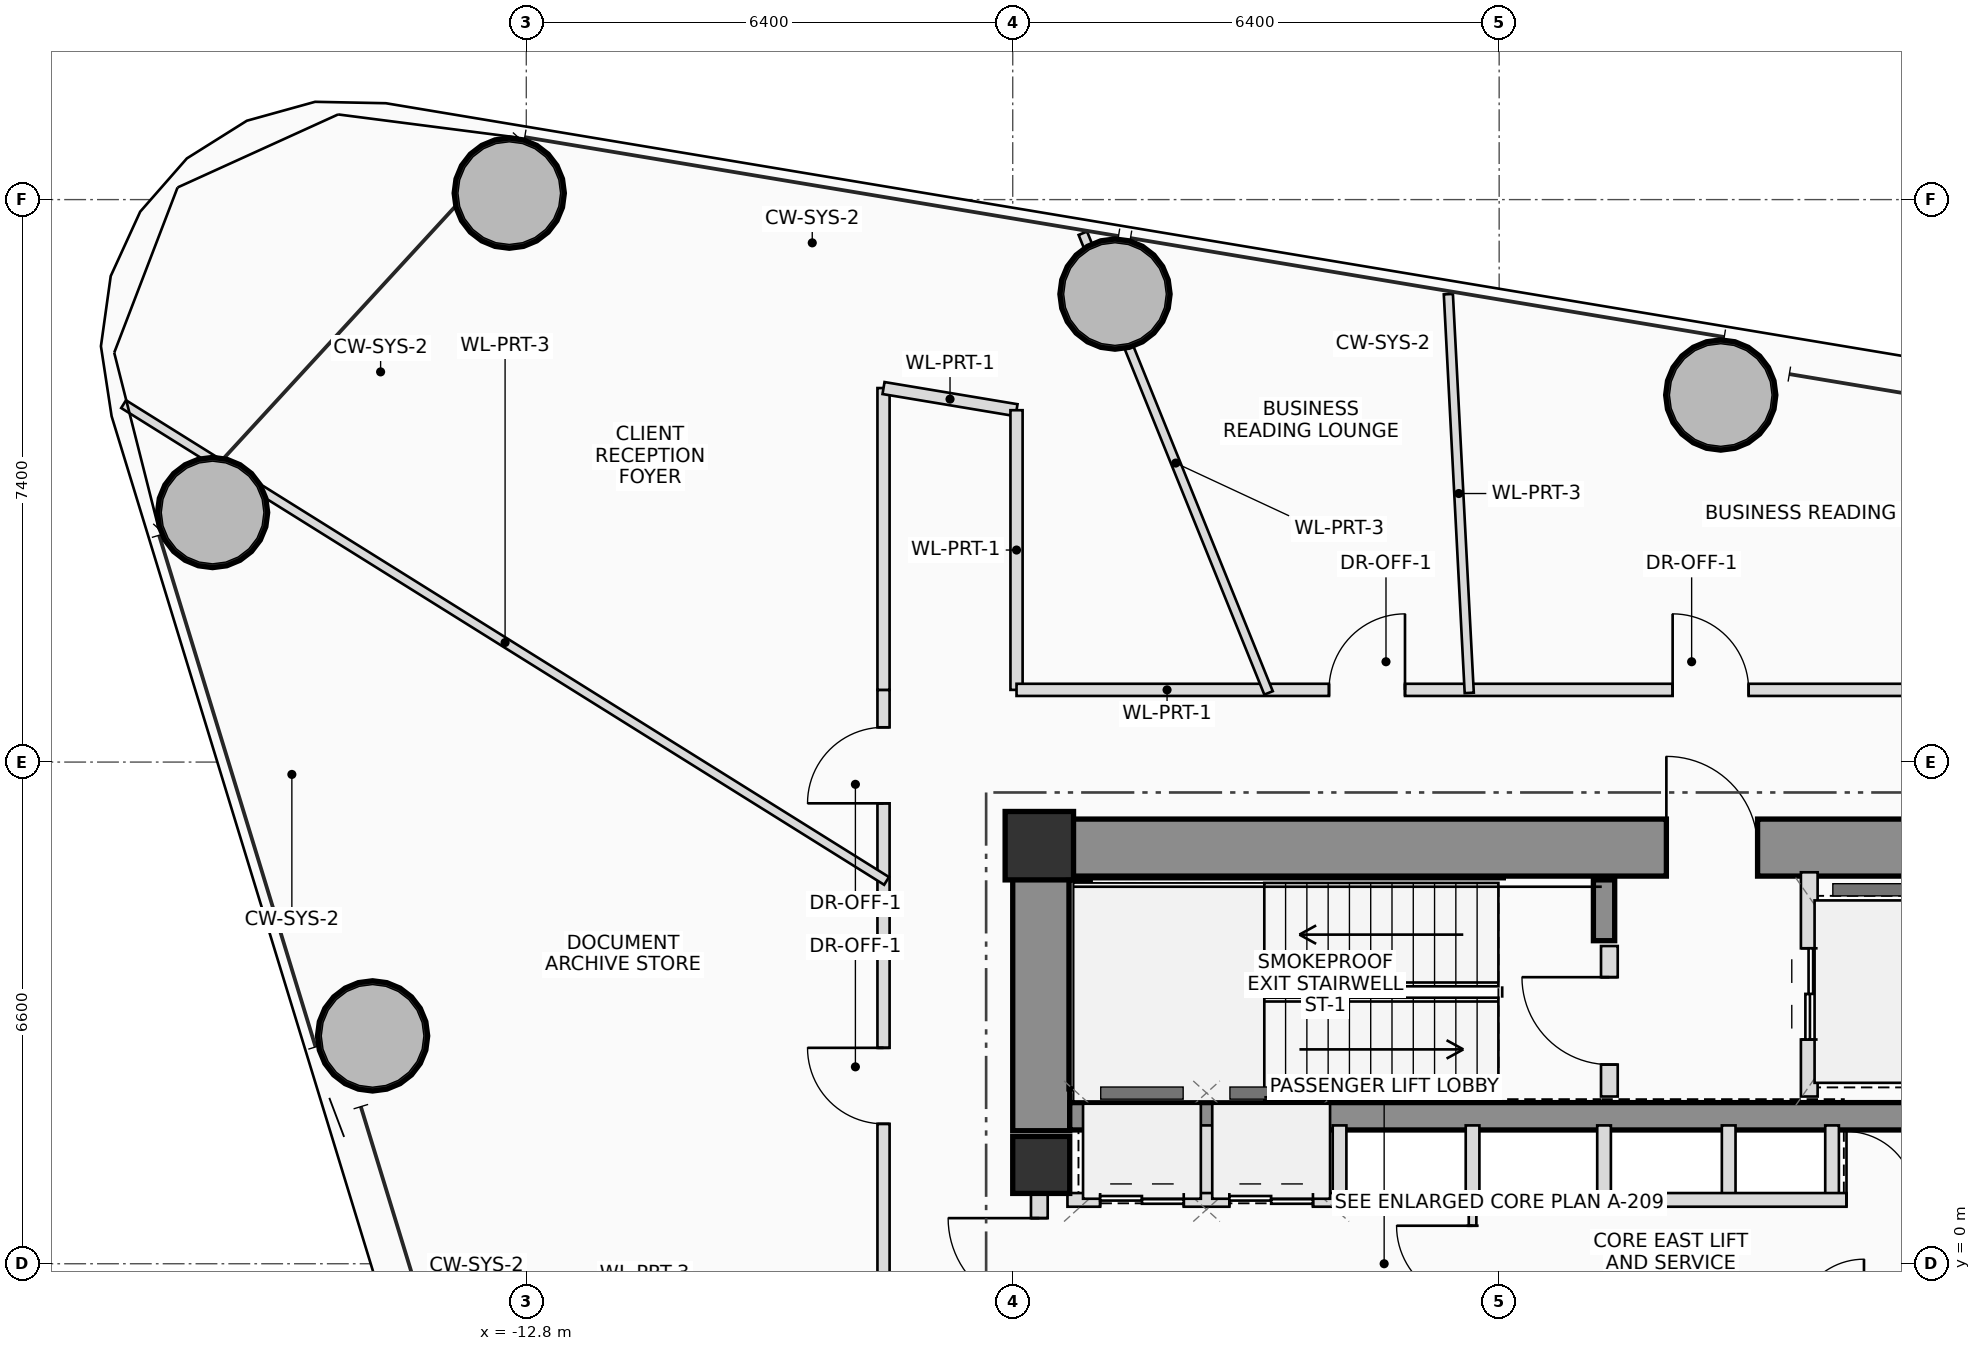
"""IFC4 building model, lengths in metres.
Left out: names, types, materials, properties, quantities, classifications, styles, units other than length and angle.
Written with IfcOpenShell. Run it as: python <this file> out.ifc"""

import sys

from ifc_helpers import new_model, si_unit, direction, frame, frame_2d, origin, origin_2d, place, context, subcontext, project, spatial, rectangle, hollow_circle, extrude, source, transform, mapped, element, fill, save


model = new_model("IFC4")
c1 = context("Model", 3, precision=1e-05, world=origin(), true_north=direction((0.0, 1.0)))
c2 = subcontext(c1, "Body", "Model", "MODEL_VIEW")
j1 = project(units=[si_unit("LENGTHUNIT", "METRE"), si_unit("PLANEANGLEUNIT", "RADIAN")], contexts=[c1])
p1 = place(None, origin())
s1 = spatial("IfcSite", under=j1, at=p1, CompositionType="ELEMENT")
p2 = place(p1, origin())
s2 = spatial("IfcBuilding", under=s1, at=p2, CompositionType="ELEMENT")
p3 = place(p2, frame((0.0, 0.0, 104.9)))
s3 = spatial("IfcBuildingStorey", under=s2, at=p3, CompositionType="ELEMENT", Elevation=104.9)
m1 = source(origin(), c2, "Body", "SweptSolid", [
    extrude(rectangle(XDim=0.9, YDim=0.9, at=origin_2d()), origin(), (0.0, 0.0, 1.0), 3.75),
])
p4 = place(p3, frame((-6.05, 5.5, 0.0), z_axis=(0.0, 0.0, 1.0), x_axis=(1.0, 0.0, 0.0)))
e1 = element("IfcColumn", 1, at=p4, inside=s3, PredefinedType="COLUMN", context=c2, shape_type="MappedRepresentation", body=[
    mapped(m1, transform((0.0, 0.0, 0.0), scale=1.0)),
])
p5 = place(p3, frame((-6.4, 5.475, 0.0), z_axis=(0.0, 0.0, 1.0), x_axis=(1.0, 0.0, 0.0)))
e2 = element("IfcWall", 2, at=p5, inside=s3, PredefinedType="SHEAR", context=c2, shape_type="SweptSolid", body=[
    extrude(rectangle(XDim=12.8, YDim=0.75, at=frame_2d((6.4, 0.0))), origin(), (0.0, 0.0, 1.0), 3.75),
])
p6 = place(p5, frame((8.6, 0.0, 0.0)))
e3 = element("IfcOpeningElement", 3, at=p6, cuts=e2, PredefinedType="OPENING", context=c2, shape_type="SweptSolid", body=[
    extrude(rectangle(XDim=1.2, YDim=2.2, at=frame_2d((0.6, 1.1))), frame((0.0, 0.385, 0.0), z_axis=(0.0, -1.0, 0.0), x_axis=(1.0, 0.0, 0.0)), (0.0, 0.0, 1.0), 0.77),
])
p7 = place(p3, frame((-6.025, 1.75, 0.0), z_axis=(0.0, 0.0, 1.0), x_axis=(0.0, 1.0, 0.0)))
e4 = element("IfcWall", 4, at=p7, inside=s3, PredefinedType="SHEAR", context=c2, shape_type="SweptSolid", body=[
    extrude(rectangle(XDim=3.35, YDim=0.75, at=frame_2d((1.675, 0.0))), origin(), (0.0, 0.0, 1.0), 3.75),
])
p8 = place(p3, frame((-5.65, 1.94, 0.0), z_axis=(0.0, 0.0, 1.0), x_axis=(1.0, 0.0, 0.0)))
e5 = element("IfcWall", 5, at=p8, inside=s3, PredefinedType="SHEAR", context=c2, shape_type="SweptSolid", body=[
    extrude(rectangle(XDim=11.3, YDim=0.36, at=frame_2d((5.65, 0.0))), origin(), (0.0, 0.0, 1.0), 3.75),
])
p9 = place(p3, frame((-5.52, 2.3, 0.0), z_axis=(0.0, 0.0, 1.0), x_axis=(0.0, 1.0, 0.0)))
e6 = element("IfcWall", 6, at=p9, inside=s3, PredefinedType="SHEAR", context=c2, shape_type="SweptSolid", body=[
    extrude(rectangle(XDim=2.75, YDim=0.28, at=frame_2d((1.375, 0.0))), origin(), (0.0, 0.0, 1.0), 3.75),
])
p10 = place(p3, frame((1.38, 4.25, 0.0), z_axis=(0.0, 0.0, 1.0), x_axis=(0.0, 1.0, 0.0)))
e7 = element("IfcWall", 7, at=p10, inside=s3, PredefinedType="SHEAR", context=c2, shape_type="SweptSolid", body=[
    extrude(rectangle(XDim=0.8, YDim=0.28, at=frame_2d((0.4, 0.0))), origin(), (0.0, 0.0, 1.0), 3.75),
])
m2 = source(origin(), c2, "Body", "SweptSolid", [
    extrude(rectangle(XDim=0.75, YDim=0.75, at=origin_2d()), origin(), (0.0, 0.0, 1.0), 3.75),
])
p11 = place(p3, frame((-6.025, 1.3, 0.0), z_axis=(0.0, 0.0, 1.0), x_axis=(1.0, 0.0, 0.0)))
e8 = element("IfcColumn", 8, at=p11, inside=s3, PredefinedType="COLUMN", context=c2, shape_type="MappedRepresentation", body=[
    mapped(m2, transform((0.0, 0.0, 0.0), scale=1.0)),
])
m3 = source(origin(), c2, "Body", "SweptSolid", [
    extrude(hollow_circle(Radius=0.725, WallThickness=0.05, at=origin_2d()), origin(), (0.0, 0.0, 1.0), 3.75),
])
for number, where, z_axis, x_axis in (
    (9, (2.915, 11.429, 0.0), (0.0, 0.0, 1.0), (1.0, 0.0, 0.0)),
    (10, (-5.054, 12.757, 0.0), (0.0, 0.0, 1.0), (1.0, 0.0, 0.0)),
    (11, (-13.024, 14.085, 0.0), (0.0, 0.0, 1.0), (1.0, 0.0, 0.0)),
    (12, (-16.927, 9.883, 0.0), (0.0, 0.0, 1.0), (1.0, 0.0, 0.0)),
    (13, (-14.823, 2.998, 0.0), (0.0, 0.0, 1.0), (1.0, 0.0, 0.0)),
):
    element("IfcColumn", number, at=place(p3, frame(where, z_axis=z_axis, x_axis=x_axis)), inside=s3, PredefinedType="COLUMN", context=c2, shape_type="MappedRepresentation", body=[
        mapped(m3, transform((0.0, 0.0, 0.0), scale=1.0)),
    ])
p12 = place(p3, frame((-6.05, -0.95, 0.0), z_axis=(0.0, 0.0, 1.0), x_axis=(0.0, 1.0, 0.0)))
e14 = element("IfcWall", 14, at=p12, inside=s3, PredefinedType="PLUMBINGWALL", context=c2, shape_type="SweptSolid", body=[
    extrude(rectangle(XDim=1.9, YDim=0.22, at=frame_2d((0.95, 0.0))), origin(), (0.0, 0.0, 1.0), 2.525),
])
p13 = place(p12, frame((0.35, 0.0, 0.0)))
e15 = element("IfcOpeningElement", 15, at=p13, cuts=e14, PredefinedType="OPENING", context=c2, shape_type="SweptSolid", body=[
    extrude(rectangle(XDim=1.2, YDim=2.2, at=frame_2d((0.6, 1.1))), frame((0.0, 0.12, 0.0), z_axis=(0.0, -1.0, 0.0), x_axis=(1.0, 0.0, 0.0)), (0.0, 0.0, 1.0), 0.24),
])
p14 = place(p3, frame((1.45, 2.2, 0.0), z_axis=(0.0, 0.0, 1.0), x_axis=(0.0, 1.0, 0.0)))
e16 = element("IfcWall", 16, at=p14, inside=s3, PredefinedType="PLUMBINGWALL", context=c2, shape_type="SweptSolid", body=[
    extrude(rectangle(XDim=1.98, YDim=0.22, at=frame_2d((0.99, 0.0))), origin(), (0.0, 0.0, 1.0), 3.545),
])
p15 = place(p14, frame((0.42, 0.0, 0.0)))
e17 = element("IfcOpeningElement", 17, at=p15, cuts=e16, PredefinedType="OPENING", context=c2, shape_type="SweptSolid", body=[
    extrude(rectangle(XDim=1.15, YDim=2.15, at=frame_2d((0.575, 1.075))), frame((0.0, 0.12, 0.0), z_axis=(0.0, -1.0, 0.0), x_axis=(1.0, 0.0, 0.0)), (0.0, 0.0, 1.0), 0.24),
])
p16 = place(p3, frame((4.08, 2.2, 0.0), z_axis=(0.0, 0.0, 1.0), x_axis=(0.0, 1.0, 0.0)))
e18 = element("IfcWall", 18, at=p16, inside=s3, PredefinedType="PLUMBINGWALL", context=c2, shape_type="SweptSolid", body=[
    extrude(rectangle(XDim=2.95, YDim=0.22, at=frame_2d((1.475, 0.0))), origin(), (0.0, 0.0, 1.0), 3.545),
])
p17 = place(p16, frame((0.75, 0.0, 0.0)))
e19 = element("IfcOpeningElement", 19, at=p17, cuts=e18, PredefinedType="OPENING", context=c2, shape_type="SweptSolid", body=[
    extrude(rectangle(XDim=1.2, YDim=2.25, at=frame_2d((0.6, 1.125))), frame((0.0, 0.12, 0.0), z_axis=(0.0, -1.0, 0.0), x_axis=(1.0, 0.0, 0.0)), (0.0, 0.0, 1.0), 0.24),
])
p18 = place(p3, frame((-0.35, -0.84, 0.0), z_axis=(0.0, 0.0, 1.0), x_axis=(0.0, 1.0, 0.0)))
e20 = element("IfcWall", 20, at=p18, inside=s3, PredefinedType="PARTITIONING", context=c2, shape_type="SweptSolid", body=[
    extrude(rectangle(XDim=1.68, YDim=0.1, at=frame_2d((0.84, 0.0))), origin(), (0.0, 0.0, 1.0), 3.545),
])
p19 = place(p18, frame((0.34, 0.0, 0.0)))
e21 = element("IfcOpeningElement", 21, at=p19, cuts=e20, PredefinedType="OPENING", context=c2, shape_type="SweptSolid", body=[
    extrude(rectangle(XDim=1.0, YDim=2.25, at=frame_2d((0.5, 1.125))), frame((0.0, 0.06, 0.0), z_axis=(0.0, -1.0, 0.0), x_axis=(1.0, 0.0, 0.0)), (0.0, 0.0, 1.0), 0.12),
])
for number, where, z_axis, x_axis in (
    (22, (-3.85, 0.84, 0.0), (0.0, 0.0, 1.0), (0.0, 1.0, 0.0)),
    (23, (-2.1, 0.84, 0.0), (0.0, 0.0, 1.0), (0.0, 1.0, 0.0)),
    (24, (-0.35, 0.84, 0.0), (0.0, 0.0, 1.0), (0.0, 1.0, 0.0)),
    (25, (1.38, 0.84, 0.0), (0.0, 0.0, 1.0), (0.0, 1.0, 0.0)),
    (26, (3.02, 0.84, 0.0), (0.0, 0.0, 1.0), (0.0, 1.0, 0.0)),
    (27, (4.38, 0.84, 0.0), (0.0, 0.0, 1.0), (0.0, 1.0, 0.0)),
):
    element("IfcWall", number, at=place(p3, frame(where, z_axis=z_axis, x_axis=x_axis)), inside=s3, PredefinedType="PLUMBINGWALL", context=c2, shape_type="SweptSolid", body=[
        extrude(rectangle(XDim=0.98, YDim=0.18, at=frame_2d((0.49, 0.0))), origin(), (0.0, 0.0, 1.0), 3.545),
    ])
p20 = place(p3, frame((-5.68, 0.84, 0.0), z_axis=(0.0, 0.0, 1.0), x_axis=(1.0, 0.0, 0.0)))
e28 = element("IfcWall", 28, at=p20, inside=s3, PredefinedType="PLUMBINGWALL", context=c2, shape_type="SweptSolid", body=[
    extrude(rectangle(XDim=11.33, YDim=0.18, at=frame_2d((5.665, 0.0))), origin(), (0.0, 0.0, 1.0), 3.545),
])
p21 = place(p20, frame((0.43, 0.0, 0.0)))
e29 = element("IfcOpeningElement", 29, at=p21, cuts=e28, PredefinedType="OPENING", context=c2, shape_type="SweptSolid", body=[
    extrude(rectangle(XDim=1.1, YDim=2.2, at=frame_2d((0.55, 1.1))), frame((0.0, 0.1, 0.0), z_axis=(0.0, -1.0, 0.0), x_axis=(1.0, 0.0, 0.0)), (0.0, 0.0, 1.0), 0.2),
])
p22 = place(p20, frame((2.13, 0.0, 0.0)))
e30 = element("IfcOpeningElement", 30, at=p22, cuts=e28, PredefinedType="OPENING", context=c2, shape_type="SweptSolid", body=[
    extrude(rectangle(XDim=1.1, YDim=2.2, at=frame_2d((0.55, 1.1))), frame((0.0, 0.1, 0.0), z_axis=(0.0, -1.0, 0.0), x_axis=(1.0, 0.0, 0.0)), (0.0, 0.0, 1.0), 0.2),
])
p23 = place(p20, frame((10.25, 0.0, 0.0)))
e31 = element("IfcOpeningElement", 31, at=p23, cuts=e28, PredefinedType="OPENING", context=c2, shape_type="SweptSolid", body=[
    extrude(rectangle(XDim=0.9, YDim=2.05, at=frame_2d((0.45, 1.025))), frame((0.0, 0.1, 0.0), z_axis=(0.0, -1.0, 0.0), x_axis=(1.0, 0.0, 0.0)), (0.0, 0.0, 1.0), 0.2),
])
p24 = place(p3, frame((-8.1, -7.55, 0.0), z_axis=(0.0, 0.0, 1.0), x_axis=(0.0, 1.0, 0.0)))
e32 = element("IfcWall", 32, at=p24, inside=s3, PredefinedType="PARTITIONING", context=c2, shape_type="SweptSolid", body=[
    extrude(rectangle(XDim=15.1, YDim=0.16, at=frame_2d((7.55, 0.0))), origin(), (0.0, 0.0, 1.0), 2.85),
])
p25 = place(p24, frame((5.185, 0.0, 0.0)))
e33 = element("IfcOpeningElement", 33, at=p25, cuts=e32, PredefinedType="OPENING", context=c2, shape_type="SweptSolid", body=[
    extrude(rectangle(XDim=1.0, YDim=2.25, at=frame_2d((0.5, 1.125))), frame((0.0, 0.09, 0.0), z_axis=(0.0, -1.0, 0.0), x_axis=(1.0, 0.0, 0.0)), (0.0, 0.0, 1.0), 0.18),
])
p26 = place(p24, frame((9.39, 0.0, 0.0)))
e34 = element("IfcOpeningElement", 34, at=p26, cuts=e32, PredefinedType="OPENING", context=c2, shape_type="SweptSolid", body=[
    extrude(rectangle(XDim=1.0, YDim=2.25, at=frame_2d((0.5, 1.125))), frame((0.0, 0.09, 0.0), z_axis=(0.0, -1.0, 0.0), x_axis=(1.0, 0.0, 0.0)), (0.0, 0.0, 1.0), 0.18),
])
p27 = place(p24, frame((13.607, 0.0, 0.0)))
e35 = element("IfcOpeningElement", 35, at=p27, cuts=e32, PredefinedType="OPENING", context=c2, shape_type="SweptSolid", body=[
    extrude(rectangle(XDim=1.0, YDim=2.25, at=frame_2d((0.5, 1.125))), frame((0.0, 0.09, 0.0), z_axis=(0.0, -1.0, 0.0), x_axis=(1.0, 0.0, 0.0)), (0.0, 0.0, 1.0), 0.18),
])
p28 = place(p3, frame((-8.1, 7.55, 0.0), z_axis=(0.0, 0.0, 1.0), x_axis=(0.0, 1.0, 0.0)))
e36 = element("IfcWall", 36, at=p28, inside=s3, PredefinedType="PARTITIONING", context=c2, shape_type="SweptSolid", body=[
    extrude(rectangle(XDim=3.971, YDim=0.16, at=frame_2d((1.985, 0.0))), origin(), (0.0, 0.0, 1.0), 2.85),
])
p29 = place(p3, frame((-8.1, 11.521, 0.0), z_axis=(0.0, 0.0, 1.0), x_axis=(0.986408796856, -0.164309724253, 0.0)))
e37 = element("IfcWall", 37, at=p29, inside=s3, PredefinedType="PARTITIONING", context=c2, shape_type="SweptSolid", body=[
    extrude(rectangle(XDim=1.774, YDim=0.16, at=frame_2d((0.887, 0.0))), origin(), (0.0, 0.0, 1.0), 3.545),
])
p30 = place(p3, frame((-6.35, 11.229, 0.0), z_axis=(0.0, 0.0, 1.0), x_axis=(0.0, -1.0, 0.0)))
e38 = element("IfcWall", 38, at=p30, inside=s3, PredefinedType="PARTITIONING", context=c2, shape_type="SweptSolid", body=[
    extrude(rectangle(XDim=3.679, YDim=0.16, at=frame_2d((1.84, 0.0))), origin(), (0.0, 0.0, 1.0), 3.05),
])
p31 = place(p3, frame((-6.35, 7.55, 0.0), z_axis=(0.0, 0.0, 1.0), x_axis=(1.0, 0.0, 0.0)))
e39 = element("IfcWall", 39, at=p31, inside=s3, PredefinedType="PARTITIONING", context=c2, shape_type="SweptSolid", body=[
    extrude(rectangle(XDim=12.7, YDim=0.16, at=frame_2d((6.35, 0.0))), origin(), (0.0, 0.0, 1.0), 2.85),
])
p32 = place(p31, frame((4.111, 0.0, 0.0)))
e40 = element("IfcOpeningElement", 40, at=p32, cuts=e39, PredefinedType="OPENING", context=c2, shape_type="SweptSolid", body=[
    extrude(rectangle(XDim=1.0, YDim=2.25, at=frame_2d((0.5, 1.125))), frame((0.0, 0.09, 0.0), z_axis=(0.0, -1.0, 0.0), x_axis=(1.0, 0.0, 0.0)), (0.0, 0.0, 1.0), 0.18),
])
p33 = place(p31, frame((8.632, 0.0, 0.0)))
e41 = element("IfcOpeningElement", 41, at=p33, cuts=e39, PredefinedType="OPENING", context=c2, shape_type="SweptSolid", body=[
    extrude(rectangle(XDim=1.0, YDim=2.25, at=frame_2d((0.5, 1.125))), frame((0.0, 0.09, 0.0), z_axis=(0.0, -1.0, 0.0), x_axis=(1.0, 0.0, 0.0)), (0.0, 0.0, 1.0), 0.18),
])
p34 = place(p3, frame((-0.394, 7.51, 0.0), z_axis=(0.0, 0.0, 1.0), x_axis=(-0.052329543677, 0.998629870802, 0.0)))
e42 = element("IfcWall", 42, at=p34, inside=s3, PredefinedType="PARTITIONING", context=c2, shape_type="SweptSolid", body=[
    extrude(rectangle(XDim=5.253, YDim=0.12, at=frame_2d((2.626, 0.0))), origin(), (0.0, 0.0, 1.0), 3.01),
])
p35 = place(p3, frame((-3.034, 7.51, 0.0), z_axis=(0.0, 0.0, 1.0), x_axis=(-0.37460229318, 0.927185591963, 0.0)))
e43 = element("IfcWall", 43, at=p35, inside=s3, PredefinedType="PARTITIONING", context=c2, shape_type="SweptSolid", body=[
    extrude(rectangle(XDim=6.522, YDim=0.12, at=frame_2d((3.261, 0.0))), origin(), (0.0, 0.0, 1.0), 3.05),
])
p36 = place(p3, frame((-8.06, 5.036, 0.0), z_axis=(0.0, 0.0, 1.0), x_axis=(-0.848040015969, 0.529932195016, 0.0)))
e44 = element("IfcWall", 44, at=p36, inside=s3, PredefinedType="PARTITIONING", context=c2, shape_type="SweptSolid", body=[
    extrude(rectangle(XDim=11.837, YDim=0.12, at=frame_2d((5.918, 0.0))), origin(), (0.0, 0.0, 1.0), 2.85),
])
p37 = place(p6, origin())
e45 = element("IfcDoor", 45, at=p37, inside=s3, OperationType="SINGLE_SWING_LEFT", PredefinedType="DOOR", context=c2, shape_type="SweptSolid", body=[
    extrude(rectangle(XDim=1.2, YDim=2.2, at=frame_2d((0.6, 1.1))), frame((0.0, 0.025, 0.0), z_axis=(0.0, -1.0, 0.0), x_axis=(1.0, 0.0, 0.0)), (0.0, 0.0, 1.0), 0.05),
])
fill(e3, e45)
p38 = place(p13, origin())
e46 = element("IfcDoor", 46, at=p38, inside=s3, OperationType="SINGLE_SWING_RIGHT", PredefinedType="DOOR", context=c2, shape_type="SweptSolid", body=[
    extrude(rectangle(XDim=1.2, YDim=2.2, at=frame_2d((0.6, 1.1))), frame((0.0, 0.025, 0.0), z_axis=(0.0, -1.0, 0.0), x_axis=(1.0, 0.0, 0.0)), (0.0, 0.0, 1.0), 0.05),
])
fill(e15, e46)
p39 = place(p15, origin())
e47 = element("IfcDoor", 47, at=p39, inside=s3, OperationType="SINGLE_SWING_RIGHT", PredefinedType="DOOR", context=c2, shape_type="SweptSolid", body=[
    extrude(rectangle(XDim=1.15, YDim=2.15, at=frame_2d((0.575, 1.075))), frame((0.0, 0.025, 0.0), z_axis=(0.0, -1.0, 0.0), x_axis=(1.0, 0.0, 0.0)), (0.0, 0.0, 1.0), 0.05),
])
fill(e17, e47)
p40 = place(p17, origin())
e48 = element("IfcDoor", 48, at=p40, inside=s3, OperationType="DOUBLE_DOOR_SLIDING", PredefinedType="DOOR", context=c2, shape_type="SweptSolid", body=[
    extrude(rectangle(XDim=1.2, YDim=2.25, at=frame_2d((0.6, 1.125))), frame((0.0, 0.025, 0.0), z_axis=(0.0, -1.0, 0.0), x_axis=(1.0, 0.0, 0.0)), (0.0, 0.0, 1.0), 0.05),
])
fill(e19, e48)
p41 = place(p19, origin())
e49 = element("IfcDoor", 49, at=p41, inside=s3, OperationType="SINGLE_SWING_RIGHT", PredefinedType="DOOR", context=c2, shape_type="SweptSolid", body=[
    extrude(rectangle(XDim=1.0, YDim=2.25, at=frame_2d((0.5, 1.125))), frame((0.0, 0.025, 0.0), z_axis=(0.0, -1.0, 0.0), x_axis=(1.0, 0.0, 0.0)), (0.0, 0.0, 1.0), 0.05),
])
fill(e21, e49)
p42 = place(p21, origin())
e50 = element("IfcDoor", 50, at=p42, inside=s3, OperationType="DOUBLE_DOOR_SLIDING", PredefinedType="DOOR", context=c2, shape_type="SweptSolid", body=[
    extrude(rectangle(XDim=1.1, YDim=2.2, at=frame_2d((0.55, 1.1))), frame((0.0, 0.025, 0.0), z_axis=(0.0, -1.0, 0.0), x_axis=(1.0, 0.0, 0.0)), (0.0, 0.0, 1.0), 0.05),
])
fill(e29, e50)
p43 = place(p22, origin())
e51 = element("IfcDoor", 51, at=p43, inside=s3, OperationType="DOUBLE_DOOR_SLIDING", PredefinedType="DOOR", context=c2, shape_type="SweptSolid", body=[
    extrude(rectangle(XDim=1.1, YDim=2.2, at=frame_2d((0.55, 1.1))), frame((0.0, 0.025, 0.0), z_axis=(0.0, -1.0, 0.0), x_axis=(1.0, 0.0, 0.0)), (0.0, 0.0, 1.0), 0.05),
])
fill(e30, e51)
p44 = place(p23, origin())
e52 = element("IfcDoor", 52, at=p44, inside=s3, OperationType="SINGLE_SWING_LEFT", PredefinedType="DOOR", context=c2, shape_type="SweptSolid", body=[
    extrude(rectangle(XDim=0.9, YDim=2.05, at=frame_2d((0.45, 1.025))), frame((0.0, 0.025, 0.0), z_axis=(0.0, -1.0, 0.0), x_axis=(1.0, 0.0, 0.0)), (0.0, 0.0, 1.0), 0.05),
])
fill(e31, e52)
p45 = place(p26, origin())
e53 = element("IfcDoor", 53, at=p45, inside=s3, OperationType="SINGLE_SWING_RIGHT", PredefinedType="DOOR", context=c2, shape_type="SweptSolid", body=[
    extrude(rectangle(XDim=1.0, YDim=2.25, at=frame_2d((0.5, 1.125))), frame((0.0, 0.025, 0.0), z_axis=(0.0, -1.0, 0.0), x_axis=(1.0, 0.0, 0.0)), (0.0, 0.0, 1.0), 0.05),
])
fill(e34, e53)
p46 = place(p27, origin())
e54 = element("IfcDoor", 54, at=p46, inside=s3, OperationType="SINGLE_SWING_LEFT", PredefinedType="DOOR", context=c2, shape_type="SweptSolid", body=[
    extrude(rectangle(XDim=1.0, YDim=2.25, at=frame_2d((0.5, 1.125))), frame((0.0, 0.025, 0.0), z_axis=(0.0, -1.0, 0.0), x_axis=(1.0, 0.0, 0.0)), (0.0, 0.0, 1.0), 0.05),
])
fill(e35, e54)
p47 = place(p32, origin())
e55 = element("IfcDoor", 55, at=p47, inside=s3, OperationType="SINGLE_SWING_RIGHT", PredefinedType="DOOR", context=c2, shape_type="SweptSolid", body=[
    extrude(rectangle(XDim=1.0, YDim=2.25, at=frame_2d((0.5, 1.125))), frame((0.0, 0.025, 0.0), z_axis=(0.0, -1.0, 0.0), x_axis=(1.0, 0.0, 0.0)), (0.0, 0.0, 1.0), 0.05),
])
fill(e40, e55)
p48 = place(p33, origin())
e56 = element("IfcDoor", 56, at=p48, inside=s3, OperationType="SINGLE_SWING_LEFT", PredefinedType="DOOR", context=c2, shape_type="SweptSolid", body=[
    extrude(rectangle(XDim=1.0, YDim=2.25, at=frame_2d((0.5, 1.125))), frame((0.0, 0.025, 0.0), z_axis=(0.0, -1.0, 0.0), x_axis=(1.0, 0.0, 0.0)), (0.0, 0.0, 1.0), 0.05),
])
fill(e41, e56)
save(model, sys.argv[1])
